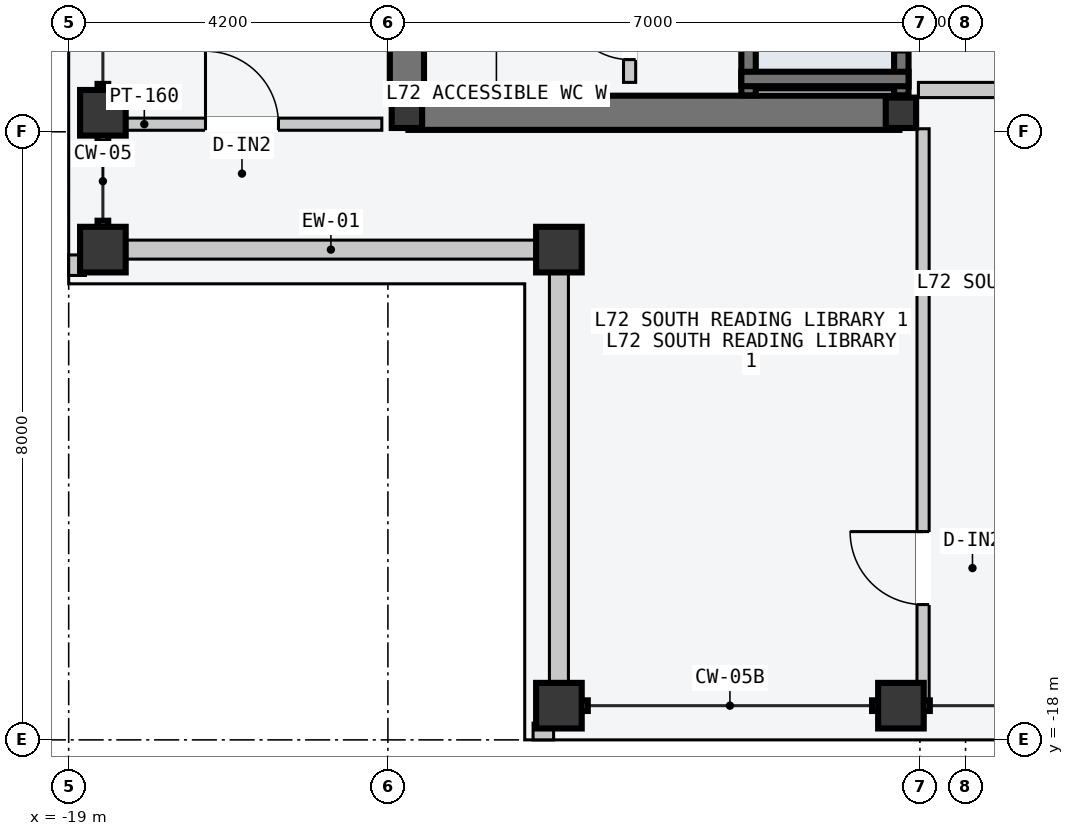
"""IFC4 building model, lengths in metres.
Left out: names, types, materials, properties, quantities, classifications, styles, units other than length and angle.
Written with IfcOpenShell. Run it as: python <this file> out.ifc"""

import sys

from ifc_helpers import new_model, si_unit, direction, frame, frame_2d, origin, origin_2d, place, context, subcontext, project, spatial, rectangle, hollow_rectangle, i_section, extrude, element, fill, save


model = new_model("IFC4")
c1 = context("Model", 3, precision=1e-05, world=origin(), true_north=direction((0.0, 1.0)))
c2 = subcontext(c1, "Body", "Model", "MODEL_VIEW")
j1 = project(units=[si_unit("LENGTHUNIT", "METRE"), si_unit("PLANEANGLEUNIT", "RADIAN")], contexts=[c1])
p1 = place(None, origin())
s1 = spatial("IfcSite", under=j1, at=p1, CompositionType="ELEMENT")
p2 = place(p1, origin())
s2 = spatial("IfcBuilding", under=s1, at=p2, CompositionType="ELEMENT")
p3 = place(p2, frame((0.0, 0.0, 272.4)))
s3 = spatial("IfcBuildingStorey", under=s2, at=p3, CompositionType="ELEMENT", Elevation=272.4)
p4 = place(p3, frame((-14.53, -9.75, -0.2), z_axis=(0.0, 0.0, 1.0), x_axis=(1.0, 0.0, 0.0)))
e1 = element("IfcWall", 1, at=p4, inside=s3, PredefinedType="SHEAR", context=c2, shape_type="SweptSolid", body=[
    extrude(rectangle(XDim=6.46, YDim=0.45, at=frame_2d((3.23, 0.0))), origin(), (0.0, 0.0, 1.0), 3.6),
])
p5 = place(p3, frame((-14.55, -9.55, -0.2), z_axis=(0.0, 0.0, 1.0), x_axis=(0.0, 1.0, 0.0)))
e2 = element("IfcWall", 2, at=p5, inside=s3, PredefinedType="SHEAR", context=c2, shape_type="SweptSolid", body=[
    extrude(rectangle(XDim=9.35, YDim=0.45, at=frame_2d((4.675, 0.0))), origin(), (0.0, 0.0, 1.0), 3.6),
])
for number, where, z_axis, x_axis in (
    (3, (-14.55, -9.75, 0.0), (0.0, 0.0, 1.0), (1.0, 0.0, 0.0)),
    (4, (-8.05, -9.75, 0.0), (0.0, 0.0, 1.0), (1.0, 0.0, 0.0)),
):
    element("IfcColumn", number, at=place(p3, frame(where, z_axis=z_axis, x_axis=x_axis)), inside=s3, PredefinedType="COLUMN", context=c2, shape_type="SweptSolid", body=[
        extrude(i_section(OverallWidth=0.4, OverallDepth=0.4, WebThickness=0.013, FlangeThickness=0.021, at=origin_2d()), origin(), (0.0, 0.0, 1.0), 3.6),
    ])
for number, where, z_axis, x_axis in (
    (5, (-12.55, -17.55, 0.0), (0.0, 0.0, 1.0), (1.0, 0.0, 0.0)),
    (6, (-8.05, -17.55, 0.0), (0.0, 0.0, 1.0), (1.0, 0.0, 0.0)),
    (7, (-18.55, -11.55, 0.0), (0.0, 0.0, 1.0), (0.0, 1.0, 0.0)),
    (8, (-18.55, -9.75, 0.0), (0.0, 0.0, 1.0), (0.0, 1.0, 0.0)),
    (9, (-12.55, -11.55, 0.0), (0.0, 0.0, 1.0), (1.0, 0.0, 0.0)),
):
    element("IfcColumn", number, at=place(p3, frame(where, z_axis=z_axis, x_axis=x_axis)), inside=s3, PredefinedType="COLUMN", context=c2, shape_type="SweptSolid", body=[
        extrude(hollow_rectangle(XDim=0.6, YDim=0.6, WallThickness=0.025, at=origin_2d()), origin(), (0.0, 0.0, 1.0), 3.6),
    ])
for number, where, z_axis, x_axis in (
    (10, (-18.24, -11.55, 0.0), (0.0, 0.0, 1.0), (1.0, 0.0, 0.0)),
    (11, (-12.55, -17.24, 0.0), (0.0, 0.0, 1.0), (0.0, 1.0, 0.0)),
):
    element("IfcWall", number, at=place(p3, frame(where, z_axis=z_axis, x_axis=x_axis)), inside=s3, PredefinedType="STANDARD", context=c2, shape_type="SweptSolid", body=[
        extrude(rectangle(XDim=5.38, YDim=0.25, at=frame_2d((2.69, 0.0))), origin(), (0.0, 0.0, 1.0), 2.85),
    ])
for number, where, z_axis, x_axis in (
    (12, (-12.89, -17.89, 0.0), (0.0, 0.0, 1.0), (1.0, 0.0, 0.0)),
    (13, (-18.89, -11.89, 0.0), (0.0, 0.0, 1.0), (0.0, 1.0, 0.0)),
):
    element("IfcWall", number, at=place(p3, frame(where, z_axis=z_axis, x_axis=x_axis)), inside=s3, PredefinedType="PARAPET", context=c2, shape_type="SweptSolid", body=[
        extrude(rectangle(XDim=0.27, YDim=0.22, at=frame_2d((0.135, 0.0))), origin(), (0.0, 0.0, 1.0), 1.2),
    ])
p6 = place(p3, frame((-8.045, -9.52, -0.2), z_axis=(0.0, 0.0, 1.0), x_axis=(0.0, 1.0, 0.0)))
e14 = element("IfcWall", 14, at=p6, inside=s3, PredefinedType="SOLIDWALL", context=c2, shape_type="SweptSolid", body=[
    extrude(rectangle(XDim=2.12, YDim=0.19, at=frame_2d((1.06, 0.0))), origin(), (0.0, 0.0, 1.0), 3.6),
])
p7 = place(p6, frame((0.57, 0.0, 0.2)))
e15 = element("IfcOpeningElement", 15, at=p7, cuts=e14, PredefinedType="OPENING", context=c2, shape_type="SweptSolid", body=[
    extrude(rectangle(XDim=1.1, YDim=2.2, at=frame_2d((0.55, 1.1))), frame((0.0, 0.105, 0.0), z_axis=(0.0, -1.0, 0.0), x_axis=(1.0, 0.0, 0.0)), (0.0, 0.0, 1.0), 0.21),
])
p8 = place(p3, frame((-10.055, -9.52, -0.2), z_axis=(0.0, 0.0, 1.0), x_axis=(0.0, 1.0, 0.0)))
e16 = element("IfcWall", 16, at=p8, inside=s3, PredefinedType="SOLIDWALL", context=c2, shape_type="SweptSolid", body=[
    extrude(rectangle(XDim=2.12, YDim=0.19, at=frame_2d((1.06, 0.0))), origin(), (0.0, 0.0, 1.0), 3.6),
])
p9 = place(p3, frame((-10.15, -9.305, -0.2), z_axis=(0.0, 0.0, 1.0), x_axis=(1.0, 0.0, 0.0)))
e17 = element("IfcWall", 17, at=p9, inside=s3, PredefinedType="SOLIDWALL", context=c2, shape_type="SweptSolid", body=[
    extrude(rectangle(XDim=2.2, YDim=0.19, at=frame_2d((1.1, 0.0))), origin(), (0.0, 0.0, 1.0), 3.6),
])
p10 = place(p3, frame((-6.02, -9.45, 0.0), z_axis=(0.0, 0.0, 1.0), x_axis=(-1.0, 0.0, 0.0)))
e18 = element("IfcWall", 18, at=p10, inside=s3, PredefinedType="PARTITIONING", context=c2, shape_type="SweptSolid", body=[
    extrude(rectangle(XDim=1.8, YDim=0.2, at=frame_2d((0.9, 0.0))), origin(), (0.0, 0.0, 1.0), 3.4),
])
p11 = place(p3, frame((-11.62, -9.35, 0.0), z_axis=(0.0, 0.0, 1.0), x_axis=(0.0, 1.0, 0.0)))
e19 = element("IfcWall", 19, at=p11, inside=s3, PredefinedType="PARTITIONING", context=c2, shape_type="SweptSolid", body=[
    extrude(rectangle(XDim=3.85, YDim=0.16, at=frame_2d((1.925, 0.0))), origin(), (0.0, 0.0, 1.0), 3.4),
])
p12 = place(p11, frame((0.3, 0.0, 0.0)))
e20 = element("IfcOpeningElement", 20, at=p12, cuts=e19, PredefinedType="OPENING", context=c2, shape_type="SweptSolid", body=[
    extrude(rectangle(XDim=0.85, YDim=2.12, at=frame_2d((0.425, 1.06))), frame((0.0, 0.09, 0.0), z_axis=(0.0, -1.0, 0.0), x_axis=(1.0, 0.0, 0.0)), (0.0, 0.0, 1.0), 0.18),
])
p13 = place(p11, frame((1.5, 0.0, 0.0)))
e21 = element("IfcOpeningElement", 21, at=p13, cuts=e19, PredefinedType="OPENING", context=c2, shape_type="SweptSolid", body=[
    extrude(rectangle(XDim=0.85, YDim=2.12, at=frame_2d((0.425, 1.06))), frame((0.0, 0.09, 0.0), z_axis=(0.0, -1.0, 0.0), x_axis=(1.0, 0.0, 0.0)), (0.0, 0.0, 1.0), 0.18),
])
p14 = place(p11, frame((2.7, 0.0, 0.0)))
e22 = element("IfcOpeningElement", 22, at=p14, cuts=e19, PredefinedType="OPENING", context=c2, shape_type="SweptSolid", body=[
    extrude(rectangle(XDim=0.85, YDim=2.12, at=frame_2d((0.425, 1.06))), frame((0.0, 0.09, 0.0), z_axis=(0.0, -1.0, 0.0), x_axis=(1.0, 0.0, 0.0)), (0.0, 0.0, 1.0), 0.18),
])
p15 = place(p3, frame((-7.759, -17.56, 0.0), z_axis=(0.0, 0.0, 1.0), x_axis=(0.0, 1.0, 0.0)))
e23 = element("IfcWall", 23, at=p15, inside=s3, PredefinedType="PARTITIONING", context=c2, shape_type="SweptSolid", body=[
    extrude(rectangle(XDim=7.6, YDim=0.16, at=frame_2d((3.8, 0.0))), origin(), (0.0, 0.0, 1.0), 3.4),
])
p16 = place(p15, frame((1.34, 0.0, 0.0)))
e24 = element("IfcOpeningElement", 24, at=p16, cuts=e23, PredefinedType="OPENING", context=c2, shape_type="SweptSolid", body=[
    extrude(rectangle(XDim=0.96, YDim=2.18, at=frame_2d((0.48, 1.09))), frame((0.0, 0.09, 0.0), z_axis=(0.0, -1.0, 0.0), x_axis=(1.0, 0.0, 0.0)), (0.0, 0.0, 1.0), 0.18),
])
p17 = place(p3, frame((-18.56, -9.9, 0.0), z_axis=(0.0, 0.0, 1.0), x_axis=(1.0, 0.0, 0.0)))
e25 = element("IfcWall", 25, at=p17, inside=s3, PredefinedType="PARTITIONING", context=c2, shape_type="SweptSolid", body=[
    extrude(rectangle(XDim=3.68, YDim=0.16, at=frame_2d((1.84, 0.0))), origin(), (0.0, 0.0, 1.0), 3.4),
])
p18 = place(p17, frame((1.36, 0.0, 0.0)))
e26 = element("IfcOpeningElement", 26, at=p18, cuts=e25, PredefinedType="OPENING", context=c2, shape_type="SweptSolid", body=[
    extrude(rectangle(XDim=0.96, YDim=2.18, at=frame_2d((0.48, 1.09))), frame((0.0, 0.09, 0.0), z_axis=(0.0, -1.0, 0.0), x_axis=(1.0, 0.0, 0.0)), (0.0, 0.0, 1.0), 0.18),
])
p19 = place(p12, origin())
e27 = element("IfcDoor", 27, at=p19, inside=s3, OperationType="SINGLE_SWING_RIGHT", PredefinedType="DOOR", context=c2, shape_type="SweptSolid", body=[
    extrude(rectangle(XDim=0.85, YDim=2.12, at=frame_2d((0.425, 1.06))), frame((0.0, 0.025, 0.0), z_axis=(0.0, -1.0, 0.0), x_axis=(1.0, 0.0, 0.0)), (0.0, 0.0, 1.0), 0.05),
])
fill(e20, e27)
p20 = place(p16, origin())
e28 = element("IfcDoor", 28, at=p20, inside=s3, OperationType="SINGLE_SWING_RIGHT", PredefinedType="DOOR", context=c2, shape_type="SweptSolid", body=[
    extrude(rectangle(XDim=0.96, YDim=2.18, at=frame_2d((0.48, 1.09))), frame((0.0, 0.025, 0.0), z_axis=(0.0, -1.0, 0.0), x_axis=(1.0, 0.0, 0.0)), (0.0, 0.0, 1.0), 0.05),
])
fill(e24, e28)
p21 = place(p18, origin())
e29 = element("IfcDoor", 29, at=p21, inside=s3, OperationType="SINGLE_SWING_LEFT", PredefinedType="DOOR", context=c2, shape_type="SweptSolid", body=[
    extrude(rectangle(XDim=0.96, YDim=2.18, at=frame_2d((0.48, 1.09))), frame((0.0, 0.025, 0.0), z_axis=(0.0, -1.0, 0.0), x_axis=(1.0, 0.0, 0.0)), (0.0, 0.0, 1.0), 0.05),
])
fill(e26, e29)
save(model, sys.argv[1])
